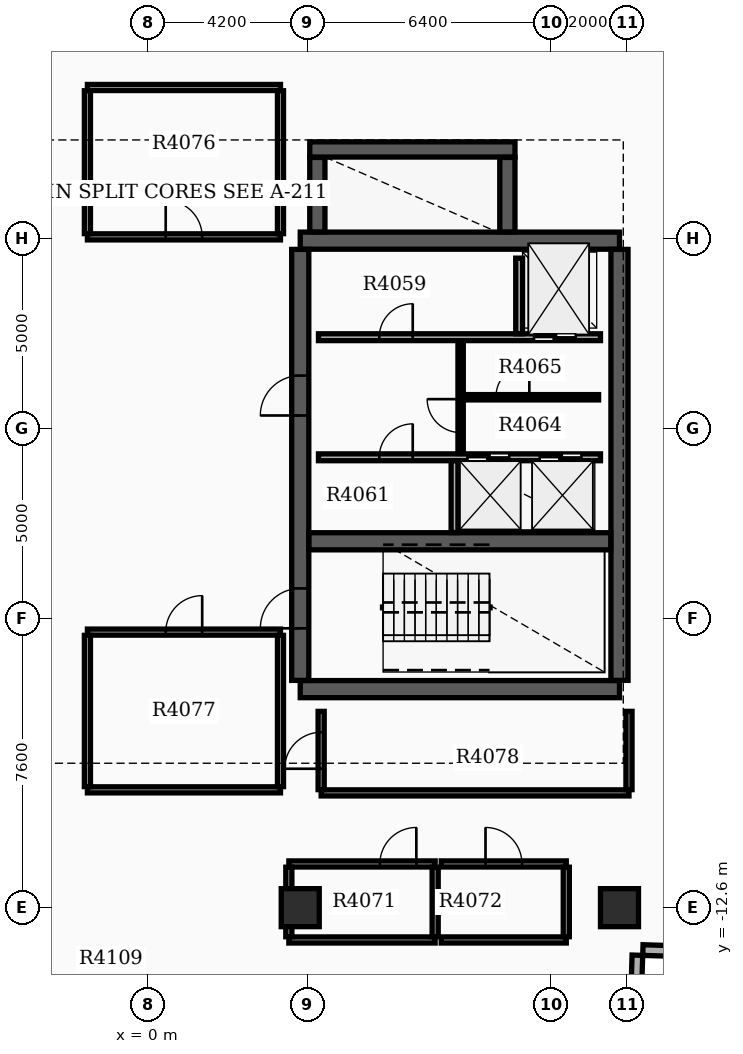
"""IFC4 building model, lengths in metres.
Left out: names, types, materials, properties, quantities, classifications, styles, units other than length and angle.
Written with IfcOpenShell. Run it as: python <this file> out.ifc"""

import sys

from ifc_helpers import new_model, si_unit, direction, frame, frame_2d, origin, origin_2d, place, context, subcontext, project, spatial, rectangle, extrude, element, fill, save


model = new_model("IFC4")
c1 = context("Model", 3, precision=1e-05, world=origin(), true_north=direction((0.0, 1.0)))
c2 = subcontext(c1, "Body", "Model", "MODEL_VIEW")
j1 = project(units=[si_unit("LENGTHUNIT", "METRE"), si_unit("PLANEANGLEUNIT", "RADIAN")], contexts=[c1])
p1 = place(None, origin())
s1 = spatial("IfcSite", under=j1, at=p1, CompositionType="ELEMENT")
p2 = place(p1, origin())
s2 = spatial("IfcBuilding", under=s1, at=p2, CompositionType="ELEMENT")
p3 = place(p2, frame((0.0, 0.0, 257.7)))
s3 = spatial("IfcBuildingStorey", under=s2, at=p3, CompositionType="ELEMENT", Elevation=257.7)
for number, where, z_axis, x_axis in (
    (1, (4.0, -6.85, 0.0), (0.0, 0.0, 1.0), (1.0, 0.0, 0.0)),
    (2, (4.0, 4.95, 0.0), (0.0, 0.0, 1.0), (1.0, 0.0, 0.0)),
):
    element("IfcWall", number, at=place(p3, frame(where, z_axis=z_axis, x_axis=x_axis)), inside=s3, PredefinedType="SHEAR", context=c2, shape_type="SweptSolid", body=[
        extrude(rectangle(XDim=8.4, YDim=0.45, at=frame_2d((4.2, 0.0))), origin(), (0.0, 0.0, 1.0), 3.7),
    ])
p4 = place(p3, frame((4.0, -6.62, 0.0), z_axis=(0.0, 0.0, 1.0), x_axis=(0.0, 1.0, 0.0)))
e3 = element("IfcWall", 3, at=p4, inside=s3, PredefinedType="SHEAR", context=c2, shape_type="SweptSolid", body=[
    extrude(rectangle(XDim=11.34, YDim=0.45, at=frame_2d((5.67, 0.0))), origin(), (0.0, 0.0, 1.0), 3.7),
])
p5 = place(p4, frame((1.37, 0.0, 0.0)))
e4 = element("IfcOpeningElement", 4, at=p5, cuts=e3, PredefinedType="OPENING", context=c2, shape_type="SweptSolid", body=[
    extrude(rectangle(XDim=1.05, YDim=2.15, at=frame_2d((0.525, 1.075))), frame((0.0, 0.235, 0.0), z_axis=(0.0, -1.0, 0.0), x_axis=(1.0, 0.0, 0.0)), (0.0, 0.0, 1.0), 0.47),
])
p6 = place(p4, frame((6.97, 0.0, 0.0)))
e5 = element("IfcOpeningElement", 5, at=p6, cuts=e3, PredefinedType="OPENING", context=c2, shape_type="SweptSolid", body=[
    extrude(rectangle(XDim=1.05, YDim=2.15, at=frame_2d((0.525, 1.075))), frame((0.0, 0.235, 0.0), z_axis=(0.0, -1.0, 0.0), x_axis=(1.0, 0.0, 0.0)), (0.0, 0.0, 1.0), 0.47),
])
p7 = place(p3, frame((12.4, -6.62, 0.0), z_axis=(0.0, 0.0, 1.0), x_axis=(0.0, 1.0, 0.0)))
e6 = element("IfcWall", 6, at=p7, inside=s3, PredefinedType="SHEAR", context=c2, shape_type="SweptSolid", body=[
    extrude(rectangle(XDim=11.34, YDim=0.45, at=frame_2d((5.67, 0.0))), origin(), (0.0, 0.0, 1.0), 3.7),
])
p8 = place(p3, frame((4.23, -2.96, 0.0), z_axis=(0.0, 0.0, 1.0), x_axis=(1.0, 0.0, 0.0)))
e7 = element("IfcWall", 7, at=p8, inside=s3, PredefinedType="SHEAR", context=c2, shape_type="SweptSolid", body=[
    extrude(rectangle(XDim=7.94, YDim=0.45, at=frame_2d((3.97, 0.0))), origin(), (0.0, 0.0, 1.0), 3.7),
])
p9 = place(p3, frame((4.45, 5.18, 0.0), z_axis=(0.0, 0.0, 1.0), x_axis=(0.0, 1.0, 0.0)))
e8 = element("IfcWall", 8, at=p9, inside=s3, PredefinedType="SHEAR", context=c2, shape_type="SweptSolid", body=[
    extrude(rectangle(XDim=1.96, YDim=0.4, at=frame_2d((0.98, 0.0))), origin(), (0.0, 0.0, 1.0), 3.7),
])
p10 = place(p3, frame((4.25, 7.35, 0.0), z_axis=(0.0, 0.0, 1.0), x_axis=(1.0, 0.0, 0.0)))
e9 = element("IfcWall", 9, at=p10, inside=s3, PredefinedType="SHEAR", context=c2, shape_type="SweptSolid", body=[
    extrude(rectangle(XDim=5.4, YDim=0.4, at=frame_2d((2.7, 0.0))), origin(), (0.0, 0.0, 1.0), 3.7),
])
p11 = place(p3, frame((9.45, 5.18, 0.0), z_axis=(0.0, 0.0, 1.0), x_axis=(0.0, 1.0, 0.0)))
e10 = element("IfcWall", 10, at=p11, inside=s3, PredefinedType="SHEAR", context=c2, shape_type="SweptSolid", body=[
    extrude(rectangle(XDim=1.96, YDim=0.4, at=frame_2d((0.98, 0.0))), origin(), (0.0, 0.0, 1.0), 3.7),
])
for number, where, z_axis, x_axis in (
    (11, (12.4, -12.6, 0.0), (0.0, 0.0, 1.0), (1.0, 0.0, 0.0)),
    (12, (4.0, -12.6, 0.0), (0.0, 0.0, 1.0), (1.0, 0.0, 0.0)),
):
    element("IfcColumn", number, at=place(p3, frame(where, z_axis=z_axis, x_axis=x_axis)), inside=s3, PredefinedType="COLUMN", context=c2, shape_type="SweptSolid", body=[
        extrude(rectangle(XDim=1.0, YDim=1.0, at=origin_2d()), origin(), (0.0, 0.0, 1.0), 3.9),
    ])
p12 = place(p3, frame((14.235, -13.754, 0.0), z_axis=(0.0, 0.0, 1.0), x_axis=(-0.999506398264, 0.031415916822, 0.0)))
e13 = element("IfcWall", 13, at=p12, inside=s3, PredefinedType="STANDARD", context=c2, shape_type="SweptSolid", body=[
    extrude(rectangle(XDim=1.22, YDim=0.28, at=frame_2d((0.61, 0.0))), origin(), (0.0, 0.0, 1.0), 3.18),
])
p13 = place(p3, frame((12.871, -13.851, 0.0), z_axis=(0.0, 0.0, 1.0), x_axis=(-0.031412596484, -0.999506502621, 0.0)))
e14 = element("IfcWall", 14, at=p13, inside=s3, PredefinedType="STANDARD", context=c2, shape_type="SweptSolid", body=[
    extrude(rectangle(XDim=1.5, YDim=0.28, at=frame_2d((0.75, 0.0))), origin(), (0.0, 0.0, 1.0), 3.18),
])
p14 = place(p3, frame((4.48, 2.41, 0.0), z_axis=(0.0, 0.0, 1.0), x_axis=(1.0, 0.0, 0.0)))
e15 = element("IfcWall", 15, at=p14, inside=s3, PredefinedType="SOLIDWALL", context=c2, shape_type="SweptSolid", body=[
    extrude(rectangle(XDim=7.42, YDim=0.18, at=frame_2d((3.71, 0.0))), origin(), (0.0, 0.0, 1.0), 3.17),
])
p15 = place(p14, frame((5.67, 0.0, 0.0)))
e16 = element("IfcOpeningElement", 16, at=p15, cuts=e15, PredefinedType="OPENING", context=c2, shape_type="SweptSolid", body=[
    extrude(rectangle(XDim=1.1, YDim=2.15, at=frame_2d((0.55, 1.075))), frame((0.0, 0.1, 0.0), z_axis=(0.0, -1.0, 0.0), x_axis=(1.0, 0.0, 0.0)), (0.0, 0.0, 1.0), 0.2),
])
p16 = place(p14, frame((1.6, 0.0, 0.0)))
e17 = element("IfcOpeningElement", 17, at=p16, cuts=e15, PredefinedType="OPENING", context=c2, shape_type="SweptSolid", body=[
    extrude(rectangle(XDim=0.88, YDim=2.1, at=frame_2d((0.44, 1.05))), frame((0.0, 0.1, 0.0), z_axis=(0.0, -1.0, 0.0), x_axis=(1.0, 0.0, 0.0)), (0.0, 0.0, 1.0), 0.2),
])
p17 = place(p3, frame((4.48, -0.75, 0.0), z_axis=(0.0, 0.0, 1.0), x_axis=(1.0, 0.0, 0.0)))
e18 = element("IfcWall", 18, at=p17, inside=s3, PredefinedType="SOLIDWALL", context=c2, shape_type="SweptSolid", body=[
    extrude(rectangle(XDim=7.42, YDim=0.18, at=frame_2d((3.71, 0.0))), origin(), (0.0, 0.0, 1.0), 3.17),
])
p18 = place(p17, frame((3.92, 0.0, 0.0)))
e19 = element("IfcOpeningElement", 19, at=p18, cuts=e18, PredefinedType="OPENING", context=c2, shape_type="SweptSolid", body=[
    extrude(rectangle(XDim=1.1, YDim=2.15, at=frame_2d((0.55, 1.075))), frame((0.0, 0.1, 0.0), z_axis=(0.0, -1.0, 0.0), x_axis=(1.0, 0.0, 0.0)), (0.0, 0.0, 1.0), 0.2),
])
p19 = place(p17, frame((5.82, 0.0, 0.0)))
e20 = element("IfcOpeningElement", 20, at=p19, cuts=e18, PredefinedType="OPENING", context=c2, shape_type="SweptSolid", body=[
    extrude(rectangle(XDim=1.1, YDim=2.15, at=frame_2d((0.55, 1.075))), frame((0.0, 0.1, 0.0), z_axis=(0.0, -1.0, 0.0), x_axis=(1.0, 0.0, 0.0)), (0.0, 0.0, 1.0), 0.2),
])
p20 = place(p17, frame((1.6, 0.0, 0.0)))
e21 = element("IfcOpeningElement", 21, at=p20, cuts=e18, PredefinedType="OPENING", context=c2, shape_type="SweptSolid", body=[
    extrude(rectangle(XDim=0.88, YDim=2.1, at=frame_2d((0.44, 1.05))), frame((0.0, 0.1, 0.0), z_axis=(0.0, -1.0, 0.0), x_axis=(1.0, 0.0, 0.0)), (0.0, 0.0, 1.0), 0.2),
])
p21 = place(p3, frame((9.76, 2.5, 0.0), z_axis=(0.0, 0.0, 1.0), x_axis=(0.0, 1.0, 0.0)))
e22 = element("IfcWall", 22, at=p21, inside=s3, PredefinedType="SOLIDWALL", context=c2, shape_type="SweptSolid", body=[
    extrude(rectangle(XDim=1.99, YDim=0.18, at=frame_2d((0.995, 0.0))), origin(), (0.0, 0.0, 1.0), 3.17),
])
p22 = place(p3, frame((8.06, -2.73, 0.0), z_axis=(0.0, 0.0, 1.0), x_axis=(0.0, 1.0, 0.0)))
e23 = element("IfcWall", 23, at=p22, inside=s3, PredefinedType="SOLIDWALL", context=c2, shape_type="SweptSolid", body=[
    extrude(rectangle(XDim=1.89, YDim=0.18, at=frame_2d((0.945, 0.0))), origin(), (0.0, 0.0, 1.0), 3.17),
])
p23 = place(p3, frame((8.22, -0.65, 0.0), z_axis=(0.0, 0.0, 1.0), x_axis=(0.0, 1.0, 0.0)))
e24 = element("IfcWall", 24, at=p23, inside=s3, PredefinedType="SOLIDWALL", context=c2, shape_type="SweptSolid", body=[
    extrude(rectangle(XDim=2.96, YDim=0.14, at=frame_2d((1.48, 0.0))), origin(), (0.0, 0.0, 1.0), 3.17),
])
p24 = place(p23, frame((0.55, 0.0, 0.0)))
e25 = element("IfcOpeningElement", 25, at=p24, cuts=e24, PredefinedType="OPENING", context=c2, shape_type="SweptSolid", body=[
    extrude(rectangle(XDim=0.88, YDim=2.1, at=frame_2d((0.44, 1.05))), frame((0.0, 0.08, 0.0), z_axis=(0.0, -1.0, 0.0), x_axis=(1.0, 0.0, 0.0)), (0.0, 0.0, 1.0), 0.16),
])
p25 = place(p3, frame((8.298, 0.83, 0.0), z_axis=(0.0, 0.0, 1.0), x_axis=(1.0, 0.0, 0.0)))
e26 = element("IfcWall", 26, at=p25, inside=s3, PredefinedType="PARTITIONING", context=c2, shape_type="SweptSolid", body=[
    extrude(rectangle(XDim=3.552, YDim=0.14, at=frame_2d((1.776, 0.0))), origin(), (0.0, 0.0, 1.0), 3.17),
])
p26 = place(p25, frame((0.85, 0.0, 0.0)))
e27 = element("IfcOpeningElement", 27, at=p26, cuts=e26, PredefinedType="OPENING", context=c2, shape_type="SweptSolid", body=[
    extrude(rectangle(XDim=0.88, YDim=2.1, at=frame_2d((0.44, 1.05))), frame((0.0, 0.08, 0.0), z_axis=(0.0, -1.0, 0.0), x_axis=(1.0, 0.0, 0.0)), (0.0, 0.0, 1.0), 0.16),
])
p27 = place(p3, frame((3.7, -13.45, 0.0), z_axis=(0.0, 0.0, 1.0), x_axis=(1.0, 0.0, 0.0)))
e28 = element("IfcWall", 28, at=p27, inside=s3, PredefinedType="PARTITIONING", context=c2, shape_type="SweptSolid", body=[
    extrude(rectangle(XDim=3.85, YDim=0.16, at=frame_2d((1.925, 0.0))), origin(), (0.0, 0.0, 1.0), 3.17),
])
p28 = place(p3, frame((3.7, -11.45, 0.0), z_axis=(0.0, 0.0, 1.0), x_axis=(1.0, 0.0, 0.0)))
e29 = element("IfcWall", 29, at=p28, inside=s3, PredefinedType="PARTITIONING", context=c2, shape_type="SweptSolid", body=[
    extrude(rectangle(XDim=3.85, YDim=0.16, at=frame_2d((1.925, 0.0))), origin(), (0.0, 0.0, 1.0), 3.17),
])
p29 = place(p28, frame((2.395, 0.0, 0.0)))
e30 = element("IfcOpeningElement", 30, at=p29, cuts=e29, PredefinedType="OPENING", context=c2, shape_type="SweptSolid", body=[
    extrude(rectangle(XDim=0.96, YDim=2.15, at=frame_2d((0.48, 1.075))), frame((0.0, 0.09, 0.0), z_axis=(0.0, -1.0, 0.0), x_axis=(1.0, 0.0, 0.0)), (0.0, 0.0, 1.0), 0.18),
])
for number, where, z_axis, x_axis in (
    (31, (3.7, -13.365, 0.0), (0.0, 0.0, 1.0), (0.0, 1.0, 0.0)),
    (32, (7.55, -13.365, 0.0), (0.0, 0.0, 1.0), (0.0, 1.0, 0.0)),
):
    element("IfcWall", number, at=place(p3, frame(where, z_axis=z_axis, x_axis=x_axis)), inside=s3, PredefinedType="PARTITIONING", context=c2, shape_type="SweptSolid", body=[
        extrude(rectangle(XDim=1.83, YDim=0.16, at=frame_2d((0.915, 0.0))), origin(), (0.0, 0.0, 1.0), 3.17),
    ])
p30 = place(p3, frame((7.71, -13.45, 0.0), z_axis=(0.0, 0.0, 1.0), x_axis=(1.0, 0.0, 0.0)))
e33 = element("IfcWall", 33, at=p30, inside=s3, PredefinedType="PARTITIONING", context=c2, shape_type="SweptSolid", body=[
    extrude(rectangle(XDim=3.29, YDim=0.16, at=frame_2d((1.645, 0.0))), origin(), (0.0, 0.0, 1.0), 3.17),
])
p31 = place(p3, frame((7.71, -11.45, 0.0), z_axis=(0.0, 0.0, 1.0), x_axis=(1.0, 0.0, 0.0)))
e34 = element("IfcWall", 34, at=p31, inside=s3, PredefinedType="PARTITIONING", context=c2, shape_type="SweptSolid", body=[
    extrude(rectangle(XDim=3.29, YDim=0.16, at=frame_2d((1.645, 0.0))), origin(), (0.0, 0.0, 1.0), 3.17),
])
p32 = place(p31, frame((1.165, 0.0, 0.0)))
e35 = element("IfcOpeningElement", 35, at=p32, cuts=e34, PredefinedType="OPENING", context=c2, shape_type="SweptSolid", body=[
    extrude(rectangle(XDim=0.96, YDim=2.15, at=frame_2d((0.48, 1.075))), frame((0.0, 0.09, 0.0), z_axis=(0.0, -1.0, 0.0), x_axis=(1.0, 0.0, 0.0)), (0.0, 0.0, 1.0), 0.18),
])
p33 = place(p3, frame((11.0, -13.365, 0.0), z_axis=(0.0, 0.0, 1.0), x_axis=(0.0, 1.0, 0.0)))
e36 = element("IfcWall", 36, at=p33, inside=s3, PredefinedType="PARTITIONING", context=c2, shape_type="SweptSolid", body=[
    extrude(rectangle(XDim=1.83, YDim=0.16, at=frame_2d((0.915, 0.0))), origin(), (0.0, 0.0, 1.0), 3.17),
])
p34 = place(p3, frame((-1.6, 5.05, 0.0), z_axis=(0.0, 0.0, 1.0), x_axis=(1.0, 0.0, 0.0)))
e37 = element("IfcWall", 37, at=p34, inside=s3, PredefinedType="PARTITIONING", context=c2, shape_type="SweptSolid", body=[
    extrude(rectangle(XDim=5.08, YDim=0.16, at=frame_2d((2.54, 0.0))), origin(), (0.0, 0.0, 1.0), 3.17),
])
p35 = place(p34, frame((2.06, 0.0, 0.0)))
e38 = element("IfcOpeningElement", 38, at=p35, cuts=e37, PredefinedType="OPENING", context=c2, shape_type="SweptSolid", body=[
    extrude(rectangle(XDim=0.96, YDim=2.15, at=frame_2d((0.48, 1.075))), frame((0.0, 0.09, 0.0), z_axis=(0.0, -1.0, 0.0), x_axis=(1.0, 0.0, 0.0)), (0.0, 0.0, 1.0), 0.18),
])
p36 = place(p3, frame((-1.6, 8.98, 0.0), z_axis=(0.0, 0.0, 1.0), x_axis=(1.0, 0.0, 0.0)))
e39 = element("IfcWall", 39, at=p36, inside=s3, PredefinedType="PARTITIONING", context=c2, shape_type="SweptSolid", body=[
    extrude(rectangle(XDim=5.08, YDim=0.16, at=frame_2d((2.54, 0.0))), origin(), (0.0, 0.0, 1.0), 3.17),
])
for number, where, z_axis, x_axis in (
    (40, (-1.6, 5.135, 0.0), (0.0, 0.0, 1.0), (0.0, 1.0, 0.0)),
    (41, (3.48, 5.135, 0.0), (0.0, 0.0, 1.0), (0.0, 1.0, 0.0)),
):
    element("IfcWall", number, at=place(p3, frame(where, z_axis=z_axis, x_axis=x_axis)), inside=s3, PredefinedType="PARTITIONING", context=c2, shape_type="SweptSolid", body=[
        extrude(rectangle(XDim=3.76, YDim=0.16, at=frame_2d((1.88, 0.0))), origin(), (0.0, 0.0, 1.0), 3.17),
    ])
p37 = place(p3, frame((-1.6, -9.5, 0.0), z_axis=(0.0, 0.0, 1.0), x_axis=(1.0, 0.0, 0.0)))
e42 = element("IfcWall", 42, at=p37, inside=s3, PredefinedType="PARTITIONING", context=c2, shape_type="SweptSolid", body=[
    extrude(rectangle(XDim=5.08, YDim=0.16, at=frame_2d((2.54, 0.0))), origin(), (0.0, 0.0, 1.0), 3.17),
])
p38 = place(p3, frame((-1.6, -5.35, 0.0), z_axis=(0.0, 0.0, 1.0), x_axis=(1.0, 0.0, 0.0)))
e43 = element("IfcWall", 43, at=p38, inside=s3, PredefinedType="PARTITIONING", context=c2, shape_type="SweptSolid", body=[
    extrude(rectangle(XDim=5.08, YDim=0.16, at=frame_2d((2.54, 0.0))), origin(), (0.0, 0.0, 1.0), 3.17),
])
p39 = place(p38, frame((2.06, 0.0, 0.0)))
e44 = element("IfcOpeningElement", 44, at=p39, cuts=e43, PredefinedType="OPENING", context=c2, shape_type="SweptSolid", body=[
    extrude(rectangle(XDim=0.96, YDim=2.15, at=frame_2d((0.48, 1.075))), frame((0.0, 0.09, 0.0), z_axis=(0.0, -1.0, 0.0), x_axis=(1.0, 0.0, 0.0)), (0.0, 0.0, 1.0), 0.18),
])
for number, where, z_axis, x_axis in (
    (45, (-1.6, -9.415, 0.0), (0.0, 0.0, 1.0), (0.0, 1.0, 0.0)),
    (46, (3.48, -9.415, 0.0), (0.0, 0.0, 1.0), (0.0, 1.0, 0.0)),
):
    element("IfcWall", number, at=place(p3, frame(where, z_axis=z_axis, x_axis=x_axis)), inside=s3, PredefinedType="PARTITIONING", context=c2, shape_type="SweptSolid", body=[
        extrude(rectangle(XDim=3.98, YDim=0.16, at=frame_2d((1.99, 0.0))), origin(), (0.0, 0.0, 1.0), 3.17),
    ])
p40 = place(p3, frame((4.55, -9.58, 0.0), z_axis=(0.0, 0.0, 1.0), x_axis=(1.0, 0.0, 0.0)))
e47 = element("IfcWall", 47, at=p40, inside=s3, PredefinedType="PARTITIONING", context=c2, shape_type="SweptSolid", body=[
    extrude(rectangle(XDim=8.1, YDim=0.16, at=frame_2d((4.05, 0.0))), origin(), (0.0, 0.0, 1.0), 3.17),
])
p41 = place(p3, frame((4.55, -9.495, 0.0), z_axis=(0.0, 0.0, 1.0), x_axis=(0.0, 1.0, 0.0)))
e48 = element("IfcWall", 48, at=p41, inside=s3, PredefinedType="PARTITIONING", context=c2, shape_type="SweptSolid", body=[
    extrude(rectangle(XDim=2.06, YDim=0.16, at=frame_2d((1.03, 0.0))), origin(), (0.0, 0.0, 1.0), 3.17),
])
p42 = place(p41, frame((0.55, 0.0, 0.0)))
e49 = element("IfcOpeningElement", 49, at=p42, cuts=e48, PredefinedType="OPENING", context=c2, shape_type="SweptSolid", body=[
    extrude(rectangle(XDim=0.96, YDim=2.15, at=frame_2d((0.48, 1.075))), frame((0.0, 0.09, 0.0), z_axis=(0.0, -1.0, 0.0), x_axis=(1.0, 0.0, 0.0)), (0.0, 0.0, 1.0), 0.18),
])
p43 = place(p3, frame((12.65, -9.495, 0.0), z_axis=(0.0, 0.0, 1.0), x_axis=(0.0, 1.0, 0.0)))
e50 = element("IfcWall", 50, at=p43, inside=s3, PredefinedType="PARTITIONING", context=c2, shape_type="SweptSolid", body=[
    extrude(rectangle(XDim=2.06, YDim=0.16, at=frame_2d((1.03, 0.0))), origin(), (0.0, 0.0, 1.0), 3.17),
])
p44 = place(p3, frame((-1.659, -14.575, 0.0), z_axis=(0.0, 0.0, 1.0), x_axis=(-0.999505408206, 0.031447400002, 0.0)))
e51 = element("IfcWall", 51, at=p44, inside=s3, PredefinedType="PARTITIONING", context=c2, shape_type="SweptSolid", body=[
    extrude(rectangle(XDim=5.52, YDim=0.16, at=frame_2d((2.76, 0.0))), origin(), (0.0, 0.0, 1.0), 3.17),
])
p45 = place(p5, origin())
e52 = element("IfcDoor", 52, at=p45, inside=s3, OperationType="SINGLE_SWING_LEFT", PredefinedType="DOOR", context=c2, shape_type="SweptSolid", body=[
    extrude(rectangle(XDim=1.05, YDim=2.15, at=frame_2d((0.525, 1.075))), frame((0.0, 0.025, 0.0), z_axis=(0.0, -1.0, 0.0), x_axis=(1.0, 0.0, 0.0)), (0.0, 0.0, 1.0), 0.05),
])
fill(e4, e52)
p46 = place(p6, origin())
e53 = element("IfcDoor", 53, at=p46, inside=s3, OperationType="SINGLE_SWING_LEFT", PredefinedType="DOOR", context=c2, shape_type="SweptSolid", body=[
    extrude(rectangle(XDim=1.05, YDim=2.15, at=frame_2d((0.525, 1.075))), frame((0.0, 0.025, 0.0), z_axis=(0.0, -1.0, 0.0), x_axis=(1.0, 0.0, 0.0)), (0.0, 0.0, 1.0), 0.05),
])
fill(e5, e53)
p47 = place(p15, origin())
e54 = element("IfcDoor", 54, at=p47, inside=s3, OperationType="DOUBLE_DOOR_SLIDING", PredefinedType="DOOR", context=c2, shape_type="SweptSolid", body=[
    extrude(rectangle(XDim=1.1, YDim=2.15, at=frame_2d((0.55, 1.075))), frame((0.0, 0.025, 0.0), z_axis=(0.0, -1.0, 0.0), x_axis=(1.0, 0.0, 0.0)), (0.0, 0.0, 1.0), 0.05),
])
fill(e16, e54)
p48 = place(p18, origin())
e55 = element("IfcDoor", 55, at=p48, inside=s3, OperationType="DOUBLE_DOOR_SLIDING", PredefinedType="DOOR", context=c2, shape_type="SweptSolid", body=[
    extrude(rectangle(XDim=1.1, YDim=2.15, at=frame_2d((0.55, 1.075))), frame((0.0, 0.025, 0.0), z_axis=(0.0, -1.0, 0.0), x_axis=(1.0, 0.0, 0.0)), (0.0, 0.0, 1.0), 0.05),
])
fill(e19, e55)
p49 = place(p19, origin())
e56 = element("IfcDoor", 56, at=p49, inside=s3, OperationType="DOUBLE_DOOR_SLIDING", PredefinedType="DOOR", context=c2, shape_type="SweptSolid", body=[
    extrude(rectangle(XDim=1.1, YDim=2.15, at=frame_2d((0.55, 1.075))), frame((0.0, 0.025, 0.0), z_axis=(0.0, -1.0, 0.0), x_axis=(1.0, 0.0, 0.0)), (0.0, 0.0, 1.0), 0.05),
])
fill(e20, e56)
p50 = place(p16, origin())
e57 = element("IfcDoor", 57, at=p50, inside=s3, OperationType="SINGLE_SWING_RIGHT", PredefinedType="DOOR", context=c2, shape_type="SweptSolid", body=[
    extrude(rectangle(XDim=0.88, YDim=2.1, at=frame_2d((0.44, 1.05))), frame((0.0, 0.025, 0.0), z_axis=(0.0, -1.0, 0.0), x_axis=(1.0, 0.0, 0.0)), (0.0, 0.0, 1.0), 0.05),
])
fill(e17, e57)
p51 = place(p20, origin())
e58 = element("IfcDoor", 58, at=p51, inside=s3, OperationType="SINGLE_SWING_RIGHT", PredefinedType="DOOR", context=c2, shape_type="SweptSolid", body=[
    extrude(rectangle(XDim=0.88, YDim=2.1, at=frame_2d((0.44, 1.05))), frame((0.0, 0.025, 0.0), z_axis=(0.0, -1.0, 0.0), x_axis=(1.0, 0.0, 0.0)), (0.0, 0.0, 1.0), 0.05),
])
fill(e21, e58)
p52 = place(p24, origin())
e59 = element("IfcDoor", 59, at=p52, inside=s3, OperationType="SINGLE_SWING_RIGHT", PredefinedType="DOOR", context=c2, shape_type="SweptSolid", body=[
    extrude(rectangle(XDim=0.88, YDim=2.1, at=frame_2d((0.44, 1.05))), frame((0.0, 0.025, 0.0), z_axis=(0.0, -1.0, 0.0), x_axis=(1.0, 0.0, 0.0)), (0.0, 0.0, 1.0), 0.05),
])
fill(e25, e59)
p53 = place(p26, origin())
e60 = element("IfcDoor", 60, at=p53, inside=s3, OperationType="SINGLE_SWING_RIGHT", PredefinedType="DOOR", context=c2, shape_type="SweptSolid", body=[
    extrude(rectangle(XDim=0.88, YDim=2.1, at=frame_2d((0.44, 1.05))), frame((0.0, 0.025, 0.0), z_axis=(0.0, -1.0, 0.0), x_axis=(1.0, 0.0, 0.0)), (0.0, 0.0, 1.0), 0.05),
])
fill(e27, e60)
p54 = place(p29, origin())
e61 = element("IfcDoor", 61, at=p54, inside=s3, OperationType="SINGLE_SWING_RIGHT", PredefinedType="DOOR", context=c2, shape_type="SweptSolid", body=[
    extrude(rectangle(XDim=0.96, YDim=2.15, at=frame_2d((0.48, 1.075))), frame((0.0, 0.025, 0.0), z_axis=(0.0, -1.0, 0.0), x_axis=(1.0, 0.0, 0.0)), (0.0, 0.0, 1.0), 0.05),
])
fill(e30, e61)
p55 = place(p32, origin())
e62 = element("IfcDoor", 62, at=p55, inside=s3, OperationType="SINGLE_SWING_LEFT", PredefinedType="DOOR", context=c2, shape_type="SweptSolid", body=[
    extrude(rectangle(XDim=0.96, YDim=2.15, at=frame_2d((0.48, 1.075))), frame((0.0, 0.025, 0.0), z_axis=(0.0, -1.0, 0.0), x_axis=(1.0, 0.0, 0.0)), (0.0, 0.0, 1.0), 0.05),
])
fill(e35, e62)
p56 = place(p35, origin())
e63 = element("IfcDoor", 63, at=p56, inside=s3, OperationType="SINGLE_SWING_LEFT", PredefinedType="DOOR", context=c2, shape_type="SweptSolid", body=[
    extrude(rectangle(XDim=0.96, YDim=2.15, at=frame_2d((0.48, 1.075))), frame((0.0, 0.025, 0.0), z_axis=(0.0, -1.0, 0.0), x_axis=(1.0, 0.0, 0.0)), (0.0, 0.0, 1.0), 0.05),
])
fill(e38, e63)
p57 = place(p39, origin())
e64 = element("IfcDoor", 64, at=p57, inside=s3, OperationType="SINGLE_SWING_RIGHT", PredefinedType="DOOR", context=c2, shape_type="SweptSolid", body=[
    extrude(rectangle(XDim=0.96, YDim=2.15, at=frame_2d((0.48, 1.075))), frame((0.0, 0.025, 0.0), z_axis=(0.0, -1.0, 0.0), x_axis=(1.0, 0.0, 0.0)), (0.0, 0.0, 1.0), 0.05),
])
fill(e44, e64)
p58 = place(p42, origin())
e65 = element("IfcDoor", 65, at=p58, inside=s3, OperationType="SINGLE_SWING_LEFT", PredefinedType="DOOR", context=c2, shape_type="SweptSolid", body=[
    extrude(rectangle(XDim=0.96, YDim=2.15, at=frame_2d((0.48, 1.075))), frame((0.0, 0.025, 0.0), z_axis=(0.0, -1.0, 0.0), x_axis=(1.0, 0.0, 0.0)), (0.0, 0.0, 1.0), 0.05),
])
fill(e49, e65)
save(model, sys.argv[1])
